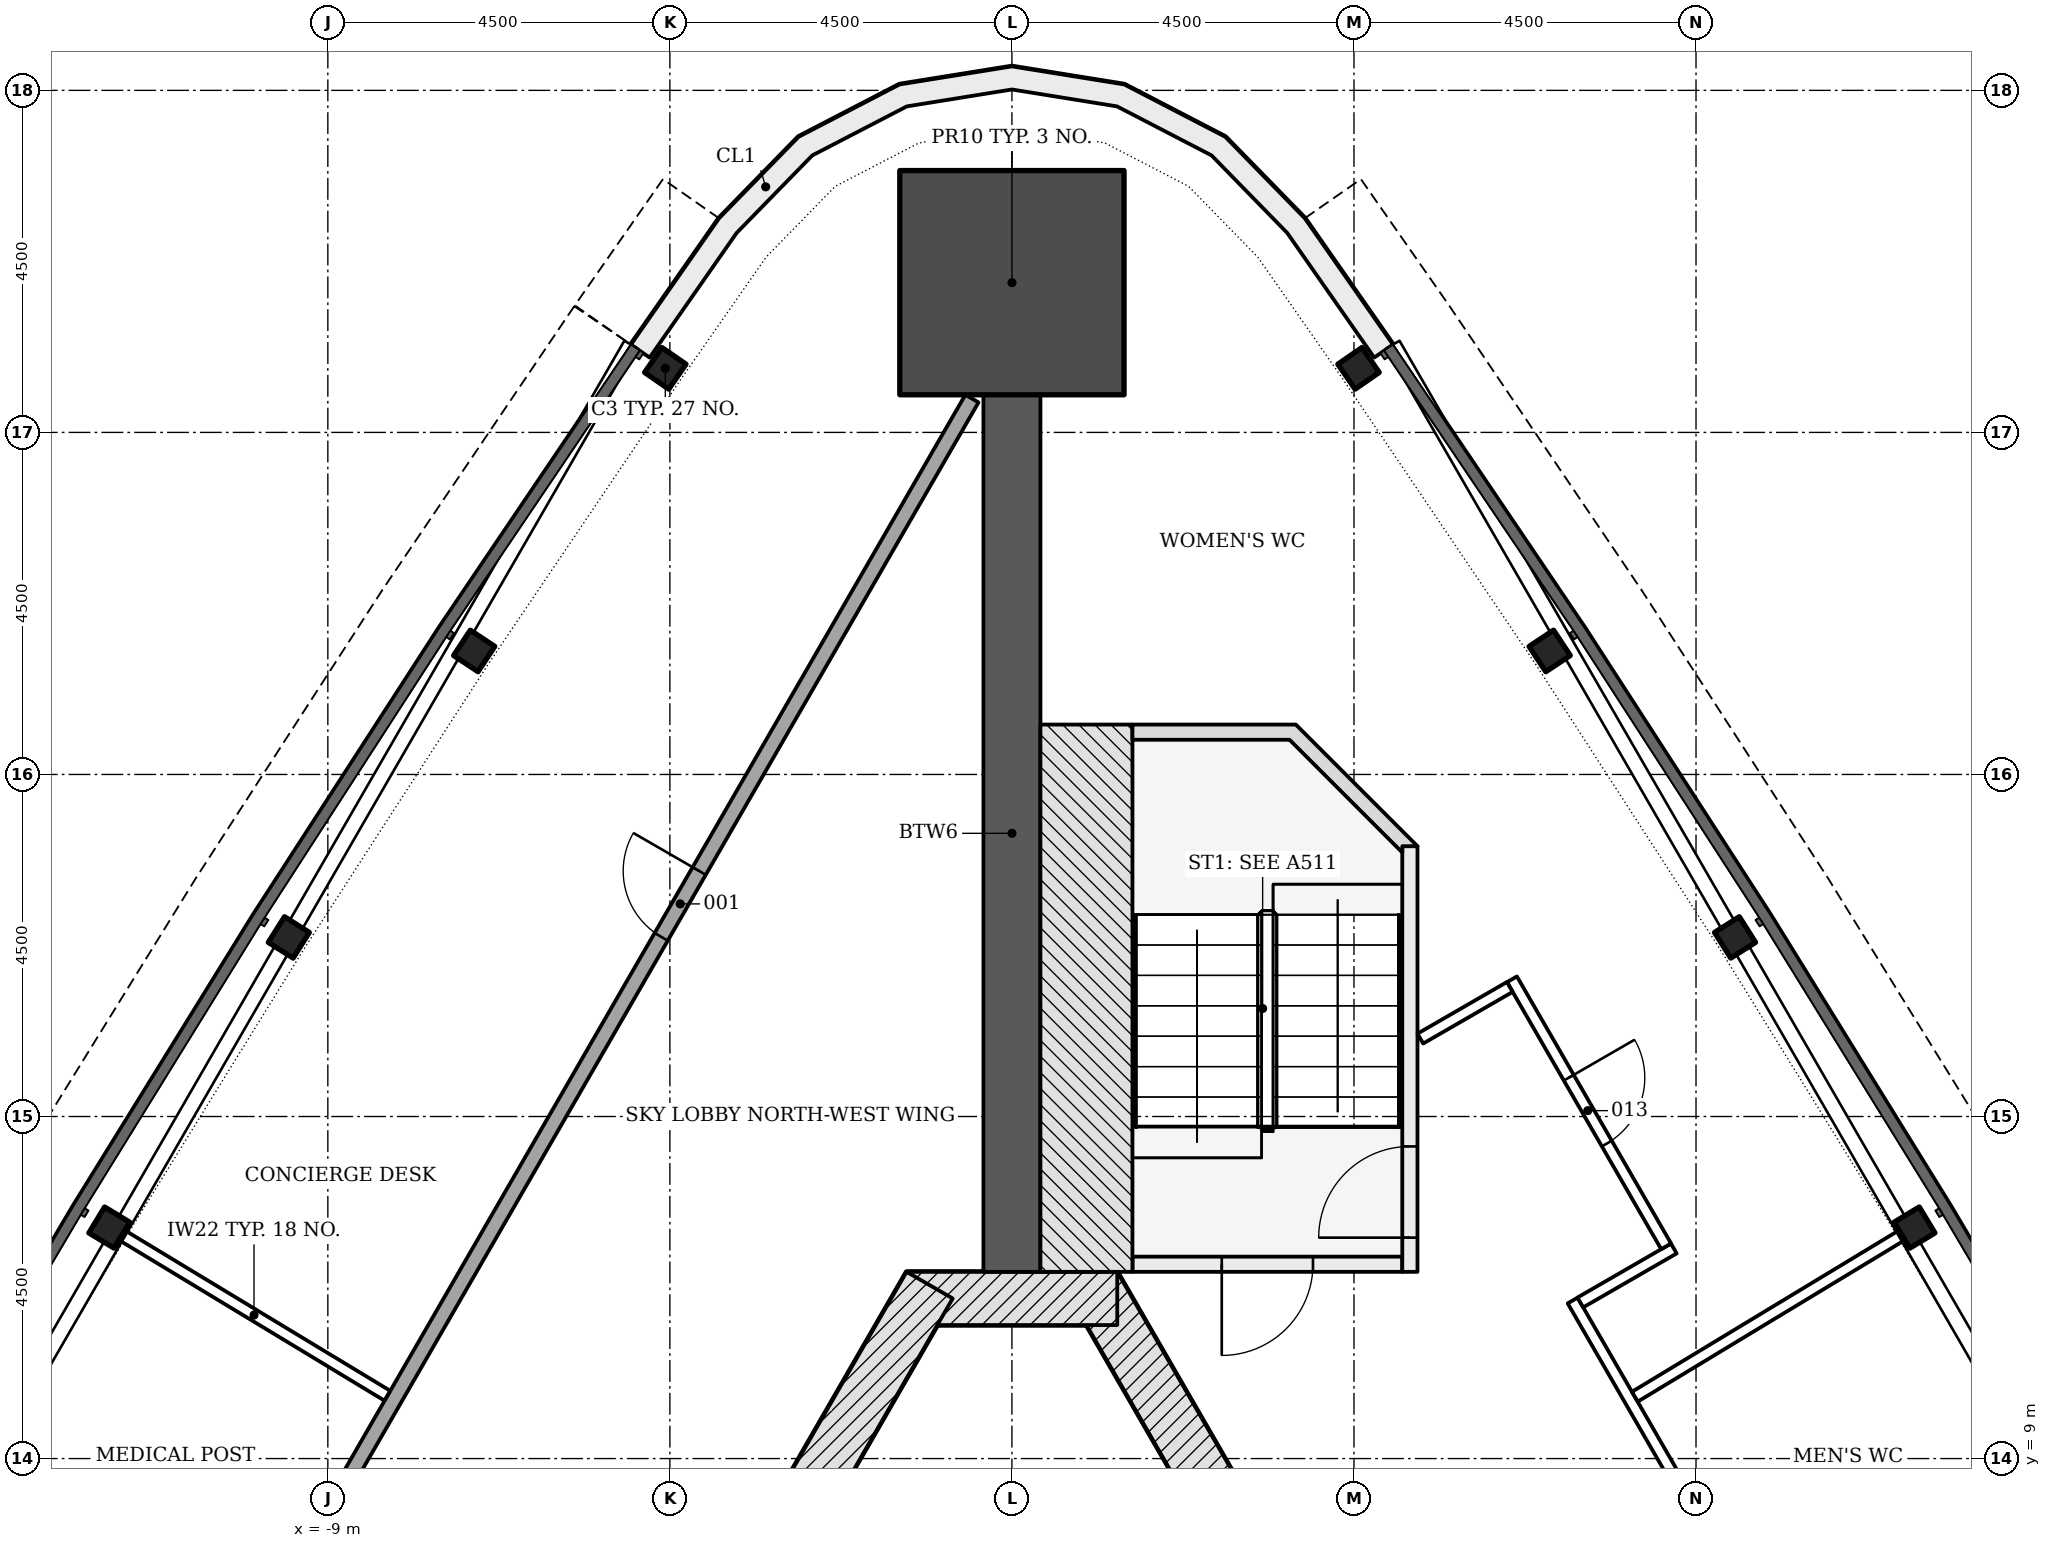
"""IFC4 building model, lengths in metres.
Left out: names, types, materials, properties, quantities, classifications, styles, units other than length and angle.
Written with IfcOpenShell. Run it as: python <this file> out.ifc"""

import sys

from ifc_helpers import new_model, si_unit, direction, frame, frame_2d, origin, origin_2d, place, context, subcontext, project, spatial, polyline, rectangle, i_section, outline, extrude, element, fill, save


model = new_model("IFC4")
c1 = context("Model", 3, precision=1e-05, world=origin(), true_north=direction((0.0, 1.0)))
c2 = subcontext(c1, "Body", "Model", "MODEL_VIEW")
j1 = project(units=[si_unit("LENGTHUNIT", "METRE"), si_unit("PLANEANGLEUNIT", "RADIAN")], contexts=[c1])
p1 = place(None, origin())
s1 = spatial("IfcSite", under=j1, at=p1, CompositionType="ELEMENT")
p2 = place(p1, origin())
s2 = spatial("IfcBuilding", under=s1, at=p2, CompositionType="ELEMENT")
p3 = place(p2, frame((0.0, 0.0, 134.7)))
s3 = spatial("IfcBuildingStorey", under=s2, at=p3, CompositionType="ELEMENT", Elevation=134.7)
p4 = place(p3, frame((10.311, -4.703, -0.3), z_axis=(0.0, 0.0, 1.0), x_axis=(-0.500001446645, 0.866024568562, 0.0)))
e1 = element("IfcWall", 1, at=p4, inside=s3, PredefinedType="SHEAR", context=c2, shape_type="SweptSolid", body=[
    extrude(rectangle(XDim=18.458, YDim=0.7, at=frame_2d((9.229, 0.0))), origin(), (0.0, 0.0, 1.0), 5.5),
])
p5 = place(p4, frame((4.379, 0.0, 0.3)))
e2 = element("IfcOpeningElement", 2, at=p5, cuts=e1, PredefinedType="OPENING", context=c2, shape_type="SweptSolid", body=[
    extrude(rectangle(XDim=1.1, YDim=2.1, at=frame_2d((0.55, 1.05))), frame((0.0, 0.36, 0.0), z_axis=(0.0, -1.0, 0.0), x_axis=(1.0, 0.0, 0.0)), (0.0, 0.0, 1.0), 0.72),
])
p6 = place(p4, frame((6.529, 0.0, 0.3)))
e3 = element("IfcOpeningElement", 3, at=p6, cuts=e1, PredefinedType="OPENING", context=c2, shape_type="SweptSolid", body=[
    extrude(rectangle(XDim=1.1, YDim=2.1, at=frame_2d((0.55, 1.05))), frame((0.0, 0.36, 0.0), z_axis=(0.0, -1.0, 0.0), x_axis=(1.0, 0.0, 0.0)), (0.0, 0.0, 1.0), 0.72),
])
p7 = place(p4, frame((8.679, 0.0, 0.3)))
e4 = element("IfcOpeningElement", 4, at=p7, cuts=e1, PredefinedType="OPENING", context=c2, shape_type="SweptSolid", body=[
    extrude(rectangle(XDim=1.1, YDim=2.1, at=frame_2d((0.55, 1.05))), frame((0.0, 0.36, 0.0), z_axis=(0.0, -1.0, 0.0), x_axis=(1.0, 0.0, 0.0)), (0.0, 0.0, 1.0), 0.72),
])
p8 = place(p4, frame((10.829, 0.0, 0.3)))
e5 = element("IfcOpeningElement", 5, at=p8, cuts=e1, PredefinedType="OPENING", context=c2, shape_type="SweptSolid", body=[
    extrude(rectangle(XDim=1.1, YDim=2.1, at=frame_2d((0.55, 1.05))), frame((0.0, 0.36, 0.0), z_axis=(0.0, -1.0, 0.0), x_axis=(1.0, 0.0, 0.0)), (0.0, 0.0, 1.0), 0.72),
])
p9 = place(p4, frame((12.979, 0.0, 0.3)))
e6 = element("IfcOpeningElement", 6, at=p9, cuts=e1, PredefinedType="OPENING", context=c2, shape_type="SweptSolid", body=[
    extrude(rectangle(XDim=1.1, YDim=2.1, at=frame_2d((0.55, 1.05))), frame((0.0, 0.36, 0.0), z_axis=(0.0, -1.0, 0.0), x_axis=(1.0, 0.0, 0.0)), (0.0, 0.0, 1.0), 0.72),
])
p10 = place(p3, frame((1.386, 11.106, -0.3), z_axis=(0.0, 0.0, 1.0), x_axis=(-1.0, 0.0, 0.0)))
e7 = element("IfcWall", 7, at=p10, inside=s3, PredefinedType="SHEAR", context=c2, shape_type="SweptSolid", body=[
    extrude(rectangle(XDim=2.771, YDim=0.7, at=frame_2d((1.386, 0.0))), origin(), (0.0, 0.0, 1.0), 5.5),
])
p11 = place(p3, frame((-1.083, 11.281, -0.3), z_axis=(0.0, 0.0, 1.0), x_axis=(-0.500001446645, -0.866024568562, 0.0)))
e8 = element("IfcWall", 8, at=p11, inside=s3, PredefinedType="SHEAR", context=c2, shape_type="SweptSolid", body=[
    extrude(rectangle(XDim=18.458, YDim=0.7, at=frame_2d((9.229, 0.0))), origin(), (0.0, 0.0, 1.0), 5.5),
])
p12 = place(p11, frame((4.029, 0.0, 0.3)))
e9 = element("IfcOpeningElement", 9, at=p12, cuts=e8, PredefinedType="OPENING", context=c2, shape_type="SweptSolid", body=[
    extrude(rectangle(XDim=1.4, YDim=2.1, at=frame_2d((0.7, 1.05))), frame((0.0, 0.36, 0.0), z_axis=(0.0, -1.0, 0.0), x_axis=(1.0, 0.0, 0.0)), (0.0, 0.0, 1.0), 0.72),
])
p13 = place(p11, frame((6.579, 0.0, 0.3)))
e10 = element("IfcOpeningElement", 10, at=p13, cuts=e8, PredefinedType="OPENING", context=c2, shape_type="SweptSolid", body=[
    extrude(rectangle(XDim=1.4, YDim=2.1, at=frame_2d((0.7, 1.05))), frame((0.0, 0.36, 0.0), z_axis=(0.0, -1.0, 0.0), x_axis=(1.0, 0.0, 0.0)), (0.0, 0.0, 1.0), 0.72),
])
p14 = place(p11, frame((8.979, 0.0, 0.3)))
e11 = element("IfcOpeningElement", 11, at=p14, cuts=e8, PredefinedType="OPENING", context=c2, shape_type="SweptSolid", body=[
    extrude(rectangle(XDim=1.2, YDim=2.1, at=frame_2d((0.6, 1.05))), frame((0.0, 0.36, 0.0), z_axis=(0.0, -1.0, 0.0), x_axis=(1.0, 0.0, 0.0)), (0.0, 0.0, 1.0), 0.72),
])
p15 = place(p11, frame((11.029, 0.0, 0.3)))
e12 = element("IfcOpeningElement", 12, at=p15, cuts=e8, PredefinedType="OPENING", context=c2, shape_type="SweptSolid", body=[
    extrude(rectangle(XDim=1.2, YDim=2.1, at=frame_2d((0.6, 1.05))), frame((0.0, 0.36, 0.0), z_axis=(0.0, -1.0, 0.0), x_axis=(1.0, 0.0, 0.0)), (0.0, 0.0, 1.0), 0.72),
])
p16 = place(p3, frame((0.0, 11.456, -0.3), z_axis=(0.0, 0.0, 1.0), x_axis=(0.0, 1.0, 0.0)))
e13 = element("IfcWall", 13, at=p16, inside=s3, PredefinedType="SHEAR", context=c2, shape_type="SweptSolid", body=[
    extrude(rectangle(XDim=11.539, YDim=0.75, at=frame_2d((5.77, 0.0))), origin(), (0.0, 0.0, 1.0), 5.5),
])
p17 = place(p3, frame((0.0, 24.47, -0.3), z_axis=(0.0, 0.0, 1.0), x_axis=(0.0, 1.0, 0.0)))
e14 = element("IfcColumn", 14, at=p17, inside=s3, PredefinedType="COLUMN", context=c2, shape_type="SweptSolid", body=[
    extrude(rectangle(XDim=2.95, YDim=2.95, at=origin_2d()), origin(), (0.0, 0.0, 1.0), 5.5),
])
for number, where, z_axis, x_axis in (
    (15, (-4.56, 23.343, -0.3), (0.0, 0.0, 1.0), (-0.569, -0.823, 0.0)),
    (16, (-7.075, 19.625, -0.3), (0.0, 0.0, 1.0), (-0.552, -0.834, 0.0)),
    (17, (-9.513, 15.856, -0.3), (0.0, 0.0, 1.0), (-0.535, -0.845, 0.0)),
    (18, (-11.875, 12.039, -0.3), (0.0, 0.0, 1.0), (-0.517, -0.856, 0.0)),
    (19, (11.875, 12.039, -0.3), (0.0, 0.0, 1.0), (-0.517, 0.856, 0.0)),
    (20, (9.513, 15.856, -0.3), (0.0, 0.0, 1.0), (-0.535, 0.845, 0.0)),
    (21, (7.075, 19.625, -0.3), (0.0, 0.0, 1.0), (-0.552, 0.834, 0.0)),
    (22, (4.56, 23.343, -0.3), (0.0, 0.0, 1.0), (-0.569, 0.823, 0.0)),
):
    element("IfcColumn", number, at=place(p3, frame(where, z_axis=z_axis, x_axis=x_axis)), inside=s3, PredefinedType="COLUMN", context=c2, shape_type="SweptSolid", body=[
        extrude(i_section(OverallWidth=0.399, OverallDepth=0.386, WebThickness=0.021, FlangeThickness=0.033, FilletRadius=0.015, at=origin_2d()), origin(), (0.0, 0.0, 1.0), 5.5),
    ])
p18 = place(p3, origin())
e23 = element("IfcWall", 23, at=p18, inside=s3, PredefinedType="NOTDEFINED", context=c2, shape_type="SweptSolid", body=[
    extrude(outline(polyline([(5.013, 23.656), (3.853, 25.317), (2.807, 26.388), (1.478, 27.078), (0.0, 27.315), (-1.478, 27.078), (-2.807, 26.388), (-3.853, 25.317), (-5.013, 23.656), (-4.767, 23.484), (-3.621, 25.125), (-2.626, 26.144), (-1.383, 26.789), (0.0, 27.011), (1.383, 26.789), (2.626, 26.144), (3.621, 25.125), (4.767, 23.484), (5.013, 23.656)])), origin(), (0.0, 0.0, 1.0), 5.2),
])
p19 = place(p3, frame((5.135, 11.556, -0.3), z_axis=(0.0, 0.0, 1.0), x_axis=(-1.0, 0.0, 0.0)))
e24 = element("IfcWall", 24, at=p19, inside=s3, PredefinedType="SHEAR", context=c2, shape_type="SweptSolid", body=[
    extrude(rectangle(XDim=3.55, YDim=0.2, at=frame_2d((1.775, 0.0))), origin(), (0.0, 0.0, 1.0), 5.5),
])
p20 = place(p19, frame((1.175, 0.0, 0.3)))
e25 = element("IfcOpeningElement", 25, at=p20, cuts=e24, PredefinedType="OPENING", context=c2, shape_type="SweptSolid", body=[
    extrude(rectangle(XDim=1.2, YDim=2.1, at=frame_2d((0.6, 1.05))), frame((0.0, 0.11, 0.0), z_axis=(0.0, -1.0, 0.0), x_axis=(1.0, 0.0, 0.0)), (0.0, 0.0, 1.0), 0.22),
])
p21 = place(p3, frame((5.236, 11.456, -0.3), z_axis=(0.0, 0.0, 1.0), x_axis=(0.0, 1.0, 0.0)))
e26 = element("IfcWall", 26, at=p21, inside=s3, PredefinedType="SHEAR", context=c2, shape_type="SweptSolid", body=[
    extrude(rectangle(XDim=5.6, YDim=0.2, at=frame_2d((2.8, 0.0))), origin(), (0.0, 0.0, 1.0), 5.5),
])
p22 = place(p21, frame((0.45, 0.0, 0.3)))
e27 = element("IfcOpeningElement", 27, at=p22, cuts=e26, PredefinedType="OPENING", context=c2, shape_type="SweptSolid", body=[
    extrude(rectangle(XDim=1.2, YDim=2.1, at=frame_2d((0.6, 1.05))), frame((0.0, 0.11, 0.0), z_axis=(0.0, -1.0, 0.0), x_axis=(1.0, 0.0, 0.0)), (0.0, 0.0, 1.0), 0.22),
])
p23 = place(p3, frame((0.98, 11.456, -0.3), z_axis=(0.0, 0.0, 1.0), x_axis=(0.0, 1.0, 0.0)))
e28 = element("IfcWall", 28, at=p23, inside=s3, PredefinedType="SHEAR", context=c2, shape_type="SweptSolid", body=[
    extrude(rectangle(XDim=7.2, YDim=1.211, at=frame_2d((3.6, 0.0))), origin(), (0.0, 0.0, 1.0), 5.5),
])
p24 = place(p3, frame((0.0, 0.0, -0.3)))
e29 = element("IfcWall", 29, at=p24, inside=s3, PredefinedType="SHEAR", context=c2, shape_type="SweptSolid", body=[
    extrude(outline(polyline([(5.336, 17.056), (3.736, 18.656), (1.586, 18.656), (1.586, 18.456), (3.653, 18.456), (5.135, 16.974), (5.135, 17.056), (5.135, 17.056), (5.135, 17.056), (5.135, 17.056), (5.135, 17.056), (5.135, 17.056), (5.135, 17.056), (5.135, 17.056), (5.135, 17.056), (5.135, 17.056), (5.135, 17.056), (5.135, 17.056), (5.135, 17.056), (5.135, 17.056), (5.135, 17.056), (5.135, 17.056), (5.135, 17.056), (5.336, 17.056)])), origin(), (0.0, 0.0, 1.0), 5.5),
])
p25 = place(p3, frame((-13.296, 0.827, 0.0), z_axis=(0.0, 0.0, 1.0), x_axis=(0.499999658466, 0.866025600969, 0.0)))
e30 = element("IfcWall", 30, at=p25, inside=s3, PredefinedType="PARTITIONING", context=c2, shape_type="SweptSolid", body=[
    extrude(rectangle(XDim=25.54, YDim=0.2, at=frame_2d((12.77, 0.0))), origin(), (0.0, 0.0, 1.0), 4.647),
])
p26 = place(p25, frame((17.363, 0.0, 0.0)))
e31 = element("IfcOpeningElement", 31, at=p26, cuts=e30, PredefinedType="OPENING", context=c2, shape_type="SweptSolid", body=[
    extrude(rectangle(XDim=1.0, YDim=2.1, at=frame_2d((0.5, 1.05))), frame((0.0, 0.11, 0.0), z_axis=(0.0, -1.0, 0.0), x_axis=(1.0, 0.0, 0.0)), (0.0, 0.0, 1.0), 0.22),
])
p27 = place(p25, frame((7.528, 0.0, 0.0)))
e32 = element("IfcOpeningElement", 32, at=p27, cuts=e30, PredefinedType="OPENING", context=c2, shape_type="SweptSolid", body=[
    extrude(rectangle(XDim=1.0, YDim=2.1, at=frame_2d((0.5, 1.05))), frame((0.0, 0.11, 0.0), z_axis=(0.0, -1.0, 0.0), x_axis=(1.0, 0.0, 0.0)), (0.0, 0.0, 1.0), 0.22),
])
p28 = place(p25, frame((3.132, 0.0, 0.0)))
e33 = element("IfcOpeningElement", 33, at=p28, cuts=e30, PredefinedType="OPENING", context=c2, shape_type="SweptSolid", body=[
    extrude(rectangle(XDim=1.2, YDim=2.1, at=frame_2d((0.6, 1.05))), frame((0.0, 0.11, 0.0), z_axis=(0.0, -1.0, 0.0), x_axis=(1.0, 0.0, 0.0)), (0.0, 0.0, 1.0), 0.22),
])
p29 = place(p3, frame((-11.725, 11.948, 0.0), z_axis=(0.0, 0.0, 1.0), x_axis=(0.85568537719, -0.517496410869, 0.0)))
e34 = element("IfcWall", 34, at=p29, inside=s3, PredefinedType="PARTITIONING", context=c2, shape_type="SweptSolid", body=[
    extrude(rectangle(XDim=4.1, YDim=0.15, at=frame_2d((2.05, 0.0))), origin(), (0.0, 0.0, 1.0), 4.647),
])
p30 = place(p3, frame((7.377, 11.079, 0.0), z_axis=(0.0, 0.0, 1.0), x_axis=(0.500006395474, -0.866021711325, 0.0)))
e35 = element("IfcWall", 35, at=p30, inside=s3, PredefinedType="PARTITIONING", context=c2, shape_type="SweptSolid", body=[
    extrude(rectangle(XDim=25.529, YDim=0.15, at=frame_2d((12.765, 0.0))), origin(), (0.0, 0.0, 1.0), 4.647),
])
p31 = place(p30, frame((17.541, 0.0, 0.0)))
e36 = element("IfcOpeningElement", 36, at=p31, cuts=e35, PredefinedType="OPENING", context=c2, shape_type="SweptSolid", body=[
    extrude(rectangle(XDim=1.0, YDim=2.1, at=frame_2d((0.5, 1.05))), frame((0.0, 0.085, 0.0), z_axis=(0.0, -1.0, 0.0), x_axis=(1.0, 0.0, 0.0)), (0.0, 0.0, 1.0), 0.17),
])
p32 = place(p30, frame((7.71, 0.0, 0.0)))
e37 = element("IfcOpeningElement", 37, at=p32, cuts=e35, PredefinedType="OPENING", context=c2, shape_type="SweptSolid", body=[
    extrude(rectangle(XDim=1.0, YDim=2.1, at=frame_2d((0.5, 1.05))), frame((0.0, 0.085, 0.0), z_axis=(0.0, -1.0, 0.0), x_axis=(1.0, 0.0, 0.0)), (0.0, 0.0, 1.0), 0.17),
])
p33 = place(p30, frame((3.311, 0.0, 0.0)))
e38 = element("IfcOpeningElement", 38, at=p33, cuts=e35, PredefinedType="OPENING", context=c2, shape_type="SweptSolid", body=[
    extrude(rectangle(XDim=1.0, YDim=2.1, at=frame_2d((0.5, 1.05))), frame((0.0, 0.085, 0.0), z_axis=(0.0, -1.0, 0.0), x_axis=(1.0, 0.0, 0.0)), (0.0, 0.0, 1.0), 0.17),
])
p34 = place(p3, frame((8.196, 9.814, 0.0), z_axis=(0.0, 0.0, 1.0), x_axis=(0.855675295062, 0.517513081401, 0.0)))
e39 = element("IfcWall", 39, at=p34, inside=s3, PredefinedType="PARTITIONING", context=c2, shape_type="SweptSolid", body=[
    extrude(rectangle(XDim=4.125, YDim=0.15, at=frame_2d((2.062, 0.0))), origin(), (0.0, 0.0, 1.0), 4.647),
])
p35 = place(p3, frame((7.478, 11.054, 0.0), z_axis=(0.0, 0.0, 1.0), x_axis=(0.86606531219, 0.499930870242, 0.0)))
e40 = element("IfcWall", 40, at=p35, inside=s3, PredefinedType="PARTITIONING", context=c2, shape_type="SweptSolid", body=[
    extrude(rectangle(XDim=1.42, YDim=0.15, at=frame_2d((0.71, 0.0))), origin(), (0.0, 0.0, 1.0), 5.2),
])
p36 = place(p3, frame((6.579, 15.305, 0.0), z_axis=(0.0, 0.0, 1.0), x_axis=(0.49997076497, -0.866042281979, 0.0)))
e41 = element("IfcWall", 41, at=p36, inside=s3, PredefinedType="PARTITIONING", context=c2, shape_type="SweptSolid", body=[
    extrude(rectangle(XDim=4.057, YDim=0.15, at=frame_2d((2.028, 0.0))), origin(), (0.0, 0.0, 1.0), 4.723),
])
p37 = place(p36, frame((1.495, 0.0, 0.0)))
e42 = element("IfcOpeningElement", 42, at=p37, cuts=e41, PredefinedType="OPENING", context=c2, shape_type="SweptSolid", body=[
    extrude(rectangle(XDim=1.0, YDim=2.1, at=frame_2d((0.5, 1.05))), frame((0.0, 0.085, 0.0), z_axis=(0.0, -1.0, 0.0), x_axis=(1.0, 0.0, 0.0)), (0.0, 0.0, 1.0), 0.17),
])
p38 = place(p3, frame((6.55, 15.205, 0.0), z_axis=(0.0, 0.0, 1.0), x_axis=(-0.865979171045, -0.500080068905, 0.0)))
e43 = element("IfcWall", 43, at=p38, inside=s3, PredefinedType="PARTITIONING", context=c2, shape_type="SweptSolid", body=[
    extrude(rectangle(XDim=1.359, YDim=0.15, at=frame_2d((0.68, 0.0))), origin(), (0.0, 0.0, 1.0), 5.2),
])
p39 = place(p20, origin())
e44 = element("IfcDoor", 44, at=p39, inside=s3, OperationType="SINGLE_SWING_RIGHT", PredefinedType="DOOR", context=c2, shape_type="SweptSolid", body=[
    extrude(rectangle(XDim=1.2, YDim=2.1, at=frame_2d((0.6, 1.05))), frame((0.0, 0.025, 0.0), z_axis=(0.0, -1.0, 0.0), x_axis=(1.0, 0.0, 0.0)), (0.0, 0.0, 1.0), 0.05),
])
fill(e25, e44)
p40 = place(p22, origin())
e45 = element("IfcDoor", 45, at=p40, inside=s3, OperationType="SINGLE_SWING_LEFT", PredefinedType="DOOR", context=c2, shape_type="SweptSolid", body=[
    extrude(rectangle(XDim=1.2, YDim=2.1, at=frame_2d((0.6, 1.05))), frame((0.0, 0.025, 0.0), z_axis=(0.0, -1.0, 0.0), x_axis=(1.0, 0.0, 0.0)), (0.0, 0.0, 1.0), 0.05),
])
fill(e27, e45)
p41 = place(p26, origin())
e46 = element("IfcDoor", 46, at=p41, inside=s3, OperationType="SINGLE_SWING_RIGHT", PredefinedType="DOOR", context=c2, shape_type="SweptSolid", body=[
    extrude(rectangle(XDim=1.0, YDim=2.1, at=frame_2d((0.5, 1.05))), frame((0.0, 0.025, 0.0), z_axis=(0.0, -1.0, 0.0), x_axis=(1.0, 0.0, 0.0)), (0.0, 0.0, 1.0), 0.05),
])
fill(e31, e46)
p42 = place(p37, origin())
e47 = element("IfcDoor", 47, at=p42, inside=s3, OperationType="SINGLE_SWING_LEFT", PredefinedType="DOOR", context=c2, shape_type="SweptSolid", body=[
    extrude(rectangle(XDim=1.0, YDim=2.1, at=frame_2d((0.5, 1.05))), frame((0.0, 0.025, 0.0), z_axis=(0.0, -1.0, 0.0), x_axis=(1.0, 0.0, 0.0)), (0.0, 0.0, 1.0), 0.05),
])
fill(e42, e47)
save(model, sys.argv[1])
